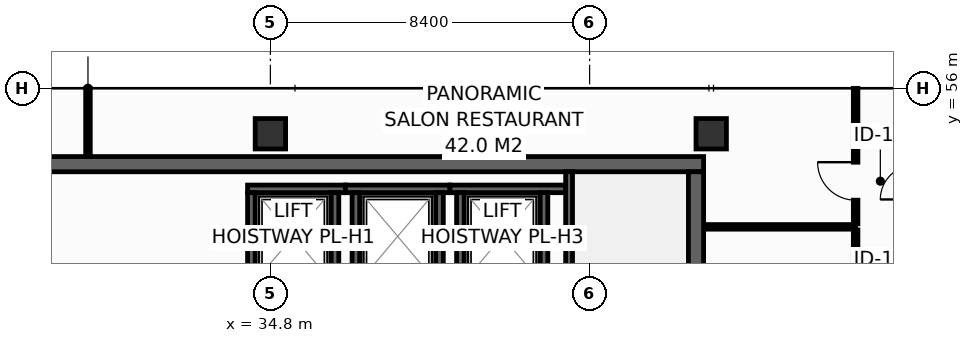
"""IFC4 building model, lengths in metres.
Left out: names, types, materials, properties, quantities, classifications, styles, units other than length and angle.
Written with IfcOpenShell. Run it as: python <this file> out.ifc"""

import sys

from ifc_helpers import new_model, si_unit, direction, frame, frame_2d, origin, origin_2d, place, context, subcontext, project, spatial, rectangle, hollow_rectangle, extrude, element, fill, save


model = new_model("IFC4")
c1 = context("Model", 3, precision=1e-05, world=origin(), true_north=direction((0.0, 1.0)))
c2 = subcontext(c1, "Body", "Model", "MODEL_VIEW")
j1 = project(units=[si_unit("LENGTHUNIT", "METRE"), si_unit("PLANEANGLEUNIT", "RADIAN")], contexts=[c1])
p1 = place(None, origin())
s1 = spatial("IfcSite", under=j1, at=p1, CompositionType="ELEMENT")
p2 = place(p1, origin())
s2 = spatial("IfcBuilding", under=s1, at=p2, CompositionType="ELEMENT")
p3 = place(p2, frame((0.0, 0.0, 253.4)))
s3 = spatial("IfcBuildingStorey", under=s2, at=p3, CompositionType="ELEMENT", Elevation=253.4)
p4 = place(p3, frame((13.7, 54.0, 0.0), z_axis=(0.0, 0.0, 1.0), x_axis=(1.0, 0.0, 0.0)))
e1 = element("IfcWall", 1, at=p4, inside=s3, PredefinedType="SHEAR", context=c2, shape_type="SweptSolid", body=[
    extrude(rectangle(XDim=32.5, YDim=0.4, at=frame_2d((16.25, 0.0))), origin(), (0.0, 0.0, 1.0), 3.55),
])
p5 = place(p3, frame((46.0, 43.4, 0.0), z_axis=(0.0, 0.0, 1.0), x_axis=(0.0, 1.0, 0.0)))
e2 = element("IfcWall", 2, at=p5, inside=s3, PredefinedType="SHEAR", context=c2, shape_type="SweptSolid", body=[
    extrude(rectangle(XDim=10.4, YDim=0.4, at=frame_2d((5.2, 0.0))), origin(), (0.0, 0.0, 1.0), 3.55),
])
for number, where, z_axis, x_axis in (
    (3, (34.8, 54.8, 0.0), (0.0, 0.0, 1.0), (1.0, 0.0, 0.0)),
    (4, (46.4, 54.8, 0.0), (0.0, 0.0, 1.0), (1.0, 0.0, 0.0)),
):
    element("IfcColumn", number, at=place(p3, frame(where, z_axis=z_axis, x_axis=x_axis)), inside=s3, PredefinedType="COLUMN", context=c2, shape_type="SweptSolid", body=[
        extrude(hollow_rectangle(XDim=0.8, YDim=0.8, WallThickness=0.036, at=origin_2d()), origin(), (0.0, 0.0, 1.0), 3.8),
    ])
p6 = place(p3, frame((34.2, 53.35, 0.0), z_axis=(0.0, 0.0, 1.0), x_axis=(1.0, 0.0, 0.0)))
e5 = element("IfcWall", 5, at=p6, inside=s3, PredefinedType="SHEAR", context=c2, shape_type="SweptSolid", body=[
    extrude(rectangle(XDim=2.575, YDim=0.2, at=frame_2d((1.288, 0.0))), origin(), (0.0, 0.0, 1.0), 3.55),
])
for number, where, z_axis, x_axis in (
    (6, (34.3, 50.95, 0.0), (0.0, 0.0, 1.0), (0.0, 1.0, 0.0)),
    (7, (36.5, 50.95, 0.0), (0.0, 0.0, 1.0), (0.0, 1.0, 0.0)),
):
    element("IfcWall", number, at=place(p3, frame(where, z_axis=z_axis, x_axis=x_axis)), inside=s3, PredefinedType="SHEAR", context=c2, shape_type="SweptSolid", body=[
        extrude(rectangle(XDim=2.3, YDim=0.2, at=frame_2d((1.15, 0.0))), origin(), (0.0, 0.0, 1.0), 3.55),
    ])
p7 = place(p3, frame((36.775, 53.35, 0.0), z_axis=(0.0, 0.0, 1.0), x_axis=(1.0, 0.0, 0.0)))
e8 = element("IfcWall", 8, at=p7, inside=s3, PredefinedType="SHEAR", context=c2, shape_type="SweptSolid", body=[
    extrude(rectangle(XDim=2.75, YDim=0.2, at=frame_2d((1.375, 0.0))), origin(), (0.0, 0.0, 1.0), 3.55),
])
for number, where, z_axis, x_axis in (
    (9, (37.05, 50.95, 0.0), (0.0, 0.0, 1.0), (0.0, 1.0, 0.0)),
    (10, (39.25, 50.95, 0.0), (0.0, 0.0, 1.0), (0.0, 1.0, 0.0)),
):
    element("IfcWall", number, at=place(p3, frame(where, z_axis=z_axis, x_axis=x_axis)), inside=s3, PredefinedType="SHEAR", context=c2, shape_type="SweptSolid", body=[
        extrude(rectangle(XDim=2.3, YDim=0.2, at=frame_2d((1.15, 0.0))), origin(), (0.0, 0.0, 1.0), 3.55),
    ])
p8 = place(p3, frame((39.525, 53.35, 0.0), z_axis=(0.0, 0.0, 1.0), x_axis=(1.0, 0.0, 0.0)))
e11 = element("IfcWall", 11, at=p8, inside=s3, PredefinedType="SHEAR", context=c2, shape_type="SweptSolid", body=[
    extrude(rectangle(XDim=3.045, YDim=0.2, at=frame_2d((1.522, 0.0))), origin(), (0.0, 0.0, 1.0), 3.55),
])
for number, where, z_axis, x_axis in (
    (12, (39.8, 50.95, 0.0), (0.0, 0.0, 1.0), (0.0, 1.0, 0.0)),
    (13, (42.0, 50.95, 0.0), (0.0, 0.0, 1.0), (0.0, 1.0, 0.0)),
):
    element("IfcWall", number, at=place(p3, frame(where, z_axis=z_axis, x_axis=x_axis)), inside=s3, PredefinedType="SHEAR", context=c2, shape_type="SweptSolid", body=[
        extrude(rectangle(XDim=2.3, YDim=0.2, at=frame_2d((1.15, 0.0))), origin(), (0.0, 0.0, 1.0), 3.55),
    ])
p9 = place(p3, frame((42.66, 53.8, 0.0), z_axis=(0.0, 0.0, 1.0), x_axis=(0.0, -1.0, 0.0)))
e14 = element("IfcWall", 14, at=p9, inside=s3, PredefinedType="SHEAR", context=c2, shape_type="SweptSolid", body=[
    extrude(rectangle(XDim=10.4, YDim=0.18, at=frame_2d((5.2, 0.0))), origin(), (0.0, 0.0, 1.0), 3.55),
])
p10 = place(p9, frame((8.99, 0.0, 0.0)))
e15 = element("IfcOpeningElement", 15, at=p10, cuts=e14, PredefinedType="OPENING", context=c2, shape_type="SweptSolid", body=[
    extrude(rectangle(XDim=1.1, YDim=2.15, at=frame_2d((0.55, 1.075))), frame((0.0, 0.1, 0.0), z_axis=(0.0, -1.0, 0.0), x_axis=(1.0, 0.0, 0.0)), (0.0, 0.0, 1.0), 0.2),
])
p11 = place(p3, frame((46.22, 52.35, 0.0), z_axis=(0.0, 0.0, 1.0), x_axis=(1.0, 0.0, 0.0)))
e16 = element("IfcWall", 16, at=p11, inside=s3, PredefinedType="PARTITIONING", context=c2, shape_type="SweptSolid", body=[
    extrude(rectangle(XDim=3.98, YDim=0.12, at=frame_2d((1.99, 0.0))), origin(), (0.0, 0.0, 1.0), 3.55),
])
p12 = place(p3, frame((30.0, 54.22, 0.0), z_axis=(0.0, 0.0, 1.0), x_axis=(0.0, 1.0, 0.0)))
e17 = element("IfcWall", 17, at=p12, inside=s3, PredefinedType="PARTITIONING", context=c2, shape_type="SweptSolid", body=[
    extrude(rectangle(XDim=1.775, YDim=0.12, at=frame_2d((0.888, 0.0))), origin(), (0.0, 0.0, 1.0), 2.935),
])
p13 = place(p3, frame((50.2, 48.29, 0.0), z_axis=(0.0, 0.0, 1.0), x_axis=(0.0, 1.0, 0.0)))
e18 = element("IfcWall", 18, at=p13, inside=s3, PredefinedType="PARTITIONING", context=c2, shape_type="SweptSolid", body=[
    extrude(rectangle(XDim=3.98, YDim=0.12, at=frame_2d((1.99, 0.0))), origin(), (0.0, 0.0, 1.0), 3.55),
])
p14 = place(p13, frame((1.49, 0.0, 0.0)))
e19 = element("IfcOpeningElement", 19, at=p14, cuts=e18, PredefinedType="OPENING", context=c2, shape_type="SweptSolid", body=[
    extrude(rectangle(XDim=1.0, YDim=2.15, at=frame_2d((0.5, 1.075))), frame((0.0, 0.07, 0.0), z_axis=(0.0, -1.0, 0.0), x_axis=(1.0, 0.0, 0.0)), (0.0, 0.0, 1.0), 0.14),
])
p15 = place(p3, frame((50.2, 52.43, 0.0), z_axis=(0.0, 0.0, 1.0), x_axis=(0.0, 1.0, 0.0)))
e20 = element("IfcWall", 20, at=p15, inside=s3, PredefinedType="PARTITIONING", context=c2, shape_type="SweptSolid", body=[
    extrude(rectangle(XDim=3.565, YDim=0.12, at=frame_2d((1.783, 0.0))), origin(), (0.0, 0.0, 1.0), 2.935),
])
p16 = place(p15, frame((0.622, 0.0, 0.0)))
e21 = element("IfcOpeningElement", 21, at=p16, cuts=e20, PredefinedType="OPENING", context=c2, shape_type="SweptSolid", body=[
    extrude(rectangle(XDim=1.0, YDim=2.15, at=frame_2d((0.5, 1.075))), frame((0.0, 0.07, 0.0), z_axis=(0.0, -1.0, 0.0), x_axis=(1.0, 0.0, 0.0)), (0.0, 0.0, 1.0), 0.14),
])
p17 = place(p16, origin())
e22 = element("IfcDoor", 22, at=p17, inside=s3, OperationType="SINGLE_SWING_RIGHT", PredefinedType="DOOR", context=c2, shape_type="SweptSolid", body=[
    extrude(rectangle(XDim=1.0, YDim=2.15, at=frame_2d((0.5, 1.075))), frame((0.0, 0.025, 0.0), z_axis=(0.0, -1.0, 0.0), x_axis=(1.0, 0.0, 0.0)), (0.0, 0.0, 1.0), 0.05),
])
fill(e21, e22)
save(model, sys.argv[1])
